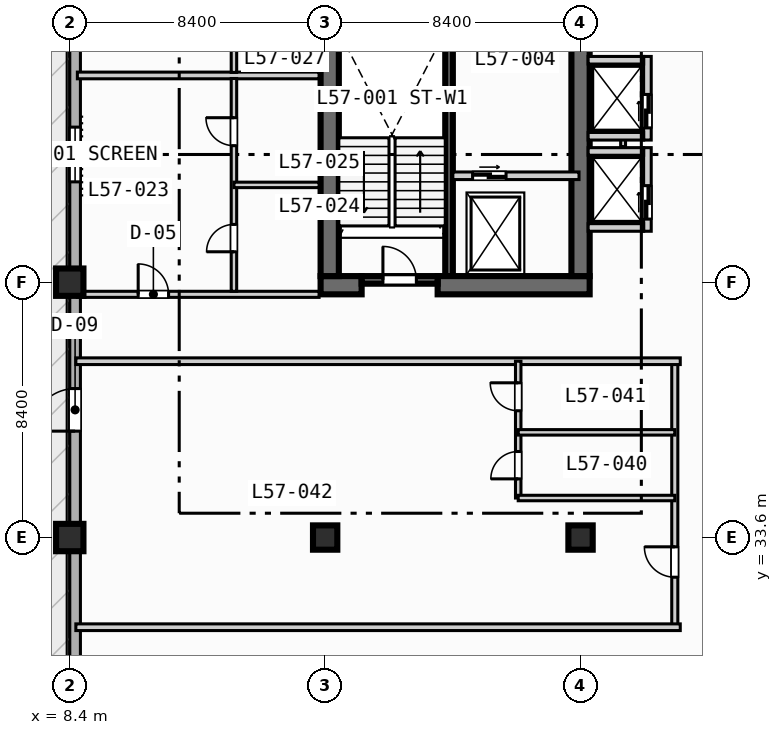
"""IFC4 building model, lengths in metres.
Left out: names, types, materials, properties, quantities, classifications, styles, units other than length and angle.
Written with IfcOpenShell. Run it as: python <this file> out.ifc"""

import sys

from ifc_helpers import new_model, si_unit, direction, frame, frame_2d, origin, origin_2d, place, context, subcontext, project, spatial, rectangle, extrude, element, fill, save


model = new_model("IFC4")
c1 = context("Model", 3, precision=1e-05, world=origin(), true_north=direction((0.0, 1.0)))
c2 = subcontext(c1, "Body", "Model", "MODEL_VIEW")
j1 = project(units=[si_unit("LENGTHUNIT", "METRE"), si_unit("PLANEANGLEUNIT", "RADIAN")], contexts=[c1])
p1 = place(None, origin())
s1 = spatial("IfcSite", under=j1, at=p1, CompositionType="ELEMENT")
p2 = place(p1, origin())
s2 = spatial("IfcBuilding", under=s1, at=p2, CompositionType="ELEMENT")
p3 = place(p2, frame((0.0, 0.0, 234.2)))
s3 = spatial("IfcBuildingStorey", under=s2, at=p3, CompositionType="ELEMENT", Elevation=234.2)
p4 = place(p3, frame((20.875, 42.2, 0.0), z_axis=(0.0, 0.0, 1.0), x_axis=(0.0, 1.0, 0.0)))
e1 = element("IfcWall", 1, at=p4, inside=s3, PredefinedType="SOLIDWALL", context=c2, shape_type="SweptSolid", body=[
    extrude(rectangle(XDim=8.05, YDim=0.25, at=frame_2d((4.025, 0.0))), origin(), (0.0, 0.0, 1.0), 3.47),
])
p5 = place(p3, frame((16.65, 41.9, 0.0), z_axis=(0.0, 0.0, 1.0), x_axis=(1.0, 0.0, 0.0)))
e2 = element("IfcWall", 2, at=p5, inside=s3, PredefinedType="SHEAR", context=c2, shape_type="SweptSolid", body=[
    extrude(rectangle(XDim=1.35, YDim=0.6, at=frame_2d((0.675, 0.0))), origin(), (0.0, 0.0, 1.0), 3.47),
])
p6 = place(p3, frame((20.5, 41.9, 0.0), z_axis=(0.0, 0.0, 1.0), x_axis=(1.0, 0.0, 0.0)))
e3 = element("IfcWall", 3, at=p6, inside=s3, PredefinedType="SHEAR", context=c2, shape_type="SweptSolid", body=[
    extrude(rectangle(XDim=5.0, YDim=0.6, at=frame_2d((2.5, 0.0))), origin(), (0.0, 0.0, 1.0), 3.47),
])
p7 = place(p3, frame((16.95, 42.2, 0.0), z_axis=(0.0, 0.0, 1.0), x_axis=(0.0, 1.0, 0.0)))
e4 = element("IfcWall", 4, at=p7, inside=s3, PredefinedType="SHEAR", context=c2, shape_type="SweptSolid", body=[
    extrude(rectangle(XDim=16.35, YDim=0.6, at=frame_2d((8.175, 0.0))), origin(), (0.0, 0.0, 1.0), 3.47),
])
p8 = place(p3, frame((25.2, 42.2, 0.0), z_axis=(0.0, 0.0, 1.0), x_axis=(0.0, 1.0, 0.0)))
e5 = element("IfcWall", 5, at=p8, inside=s3, PredefinedType="SHEAR", context=c2, shape_type="SweptSolid", body=[
    extrude(rectangle(XDim=8.6, YDim=0.6, at=frame_2d((4.3, 0.0))), origin(), (0.0, 0.0, 1.0), 3.47),
])
for number, where, z_axis, x_axis in (
    (6, (8.4, 33.6, 0.0), (0.0, 0.0, 1.0), (1.0, 0.0, 0.0)),
    (7, (8.4, 42.0, 0.0), (0.0, 0.0, 1.0), (1.0, 0.0, 0.0)),
):
    element("IfcColumn", number, at=place(p3, frame(where, z_axis=z_axis, x_axis=x_axis)), inside=s3, PredefinedType="COLUMN", context=c2, shape_type="SweptSolid", body=[
        extrude(rectangle(XDim=0.9, YDim=0.9, at=origin_2d()), origin(), (0.0, 0.0, 1.0), 3.7),
    ])
for number, where, z_axis, x_axis in (
    (8, (16.8, 33.6, 0.0), (0.0, 0.0, 1.0), (1.0, 0.0, 0.0)),
    (9, (25.2, 33.6, 0.0), (0.0, 0.0, 1.0), (1.0, 0.0, 0.0)),
):
    element("IfcColumn", number, at=place(p3, frame(where, z_axis=z_axis, x_axis=x_axis)), inside=s3, PredefinedType="COLUMN", context=c2, shape_type="SweptSolid", body=[
        extrude(rectangle(XDim=0.8, YDim=0.8, at=origin_2d()), origin(), (0.0, 0.0, 1.0), 3.7),
    ])
p9 = place(p3, frame((8.575, 11.575, 0.0), z_axis=(0.0, 0.0, 1.0), x_axis=(0.0, 1.0, 0.0)))
e10 = element("IfcWall", 10, at=p9, inside=s3, PredefinedType="STANDARD", context=c2, shape_type="SweptSolid", body=[
    extrude(rectangle(XDim=60.85, YDim=0.35, at=frame_2d((30.425, 0.0))), origin(), (0.0, 0.0, 1.0), 3.47),
])
p10 = place(p9, frame((25.525, 0.0, 0.0)))
e11 = element("IfcOpeningElement", 11, at=p10, cuts=e10, PredefinedType="OPENING", context=c2, shape_type="SweptSolid", body=[
    extrude(rectangle(XDim=1.4, YDim=2.2, at=frame_2d((0.7, 1.1))), frame((0.0, 0.185, 0.0), z_axis=(0.0, -1.0, 0.0), x_axis=(1.0, 0.0, 0.0)), (0.0, 0.0, 1.0), 0.37),
])
p11 = place(p9, frame((33.725, 0.0, 0.85)))
e12 = element("IfcOpeningElement", 12, at=p11, cuts=e10, PredefinedType="OPENING", context=c2, shape_type="SweptSolid", body=[
    extrude(rectangle(XDim=1.8, YDim=1.8, at=frame_2d((0.9, 0.9))), frame((0.0, 0.185, 0.0), z_axis=(0.0, -1.0, 0.0), x_axis=(1.0, 0.0, 0.0)), (0.0, 0.0, 1.0), 0.37),
])
p12 = place(p9, frame((41.825, 0.0, 0.85)))
e13 = element("IfcOpeningElement", 13, at=p12, cuts=e10, PredefinedType="OPENING", context=c2, shape_type="SweptSolid", body=[
    extrude(rectangle(XDim=2.4, YDim=1.95, at=frame_2d((1.2, 0.975))), frame((0.0, 0.185, 0.0), z_axis=(0.0, -1.0, 0.0), x_axis=(1.0, 0.0, 0.0)), (0.0, 0.0, 1.0), 0.37),
])
p13 = place(p3, frame((18.0, 42.075, 0.0), z_axis=(0.0, 0.0, 1.0), x_axis=(1.0, 0.0, 0.0)))
e14 = element("IfcWall", 14, at=p13, inside=s3, PredefinedType="SOLIDWALL", context=c2, shape_type="SweptSolid", body=[
    extrude(rectangle(XDim=2.5, YDim=0.25, at=frame_2d((1.25, 0.0))), origin(), (0.0, 0.0, 1.0), 3.47),
])
p14 = place(p13, frame((0.7, 0.0, 0.0)))
e15 = element("IfcOpeningElement", 15, at=p14, cuts=e14, PredefinedType="OPENING", context=c2, shape_type="SweptSolid", body=[
    extrude(rectangle(XDim=1.1, YDim=2.15, at=frame_2d((0.55, 1.075))), frame((0.0, 0.135, 0.0), z_axis=(0.0, -1.0, 0.0), x_axis=(1.0, 0.0, 0.0)), (0.0, 0.0, 1.0), 0.27),
])
p15 = place(p3, frame((21.0, 45.5, 0.0), z_axis=(0.0, 0.0, 1.0), x_axis=(1.0, 0.0, 0.0)))
e16 = element("IfcWall", 16, at=p15, inside=s3, PredefinedType="SOLIDWALL", context=c2, shape_type="SweptSolid", body=[
    extrude(rectangle(XDim=4.15, YDim=0.25, at=frame_2d((2.075, 0.0))), origin(), (0.0, 0.0, 1.0), 3.47),
])
p16 = place(p15, frame((0.65, 0.0, 0.0)))
e17 = element("IfcOpeningElement", 17, at=p16, cuts=e16, PredefinedType="OPENING", context=c2, shape_type="SweptSolid", body=[
    extrude(rectangle(XDim=1.1, YDim=2.15, at=frame_2d((0.55, 1.075))), frame((0.0, 0.135, 0.0), z_axis=(0.0, -1.0, 0.0), x_axis=(1.0, 0.0, 0.0)), (0.0, 0.0, 1.0), 0.27),
])
p17 = place(p3, frame((27.4, 43.675, 0.0), z_axis=(0.0, 0.0, 1.0), x_axis=(0.0, 1.0, 0.0)))
e18 = element("IfcWall", 18, at=p17, inside=s3, PredefinedType="SOLIDWALL", context=c2, shape_type="SweptSolid", body=[
    extrude(rectangle(XDim=2.75, YDim=0.25, at=frame_2d((1.375, 0.0))), origin(), (0.0, 0.0, 1.0), 3.47),
])
p18 = place(p17, frame((0.4, 0.0, 0.0)))
e19 = element("IfcOpeningElement", 19, at=p18, cuts=e18, PredefinedType="OPENING", context=c2, shape_type="SweptSolid", body=[
    extrude(rectangle(XDim=1.1, YDim=2.15, at=frame_2d((0.55, 1.075))), frame((0.0, 0.135, 0.0), z_axis=(0.0, -1.0, 0.0), x_axis=(1.0, 0.0, 0.0)), (0.0, 0.0, 1.0), 0.27),
])
for number, where, z_axis, x_axis in (
    (20, (25.45, 43.8, 0.0), (0.0, 0.0, 1.0), (1.0, 0.0, 0.0)),
    (21, (25.45, 46.3, 0.0), (0.0, 0.0, 1.0), (1.0, 0.0, 0.0)),
):
    element("IfcWall", number, at=place(p3, frame(where, z_axis=z_axis, x_axis=x_axis)), inside=s3, PredefinedType="SOLIDWALL", context=c2, shape_type="SweptSolid", body=[
        extrude(rectangle(XDim=1.825, YDim=0.25, at=frame_2d((0.913, 0.0))), origin(), (0.0, 0.0, 1.0), 3.47),
    ])
p19 = place(p3, frame((26.6, 46.46, 0.0), z_axis=(0.0, 0.0, 1.0), x_axis=(0.0, 1.0, 0.0)))
e22 = element("IfcWall", 22, at=p19, inside=s3, PredefinedType="PARTITIONING", context=c2, shape_type="SweptSolid", body=[
    extrude(rectangle(XDim=0.88, YDim=0.16, at=frame_2d((0.44, 0.0))), origin(), (0.0, 0.0, 1.0), 3.47),
])
p20 = place(p3, frame((27.4, 46.675, 0.0), z_axis=(0.0, 0.0, 1.0), x_axis=(0.0, 1.0, 0.0)))
e23 = element("IfcWall", 23, at=p20, inside=s3, PredefinedType="SOLIDWALL", context=c2, shape_type="SweptSolid", body=[
    extrude(rectangle(XDim=2.75, YDim=0.25, at=frame_2d((1.375, 0.0))), origin(), (0.0, 0.0, 1.0), 3.47),
])
p21 = place(p20, frame((0.4, 0.0, 0.0)))
e24 = element("IfcOpeningElement", 24, at=p21, cuts=e23, PredefinedType="OPENING", context=c2, shape_type="SweptSolid", body=[
    extrude(rectangle(XDim=1.1, YDim=2.15, at=frame_2d((0.55, 1.075))), frame((0.0, 0.135, 0.0), z_axis=(0.0, -1.0, 0.0), x_axis=(1.0, 0.0, 0.0)), (0.0, 0.0, 1.0), 0.27),
])
for number, where, z_axis, x_axis in (
    (25, (25.45, 46.8, 0.0), (0.0, 0.0, 1.0), (1.0, 0.0, 0.0)),
    (26, (25.45, 49.3, 0.0), (0.0, 0.0, 1.0), (1.0, 0.0, 0.0)),
):
    element("IfcWall", number, at=place(p3, frame(where, z_axis=z_axis, x_axis=x_axis)), inside=s3, PredefinedType="SOLIDWALL", context=c2, shape_type="SweptSolid", body=[
        extrude(rectangle(XDim=1.825, YDim=0.25, at=frame_2d((0.913, 0.0))), origin(), (0.0, 0.0, 1.0), 3.47),
    ])
p22 = place(p3, frame((8.65, 41.6, 0.0), z_axis=(0.0, 0.0, 1.0), x_axis=(1.0, 0.0, 0.0)))
e27 = element("IfcWall", 27, at=p22, inside=s3, PredefinedType="PARTITIONING", context=c2, shape_type="SweptSolid", body=[
    extrude(rectangle(XDim=7.95, YDim=0.2, at=frame_2d((3.975, 0.0))), origin(), (0.0, 0.0, 1.0), 3.47),
])
p23 = place(p22, frame((2.0, 0.0, 0.0)))
e28 = element("IfcOpeningElement", 28, at=p23, cuts=e27, PredefinedType="OPENING", context=c2, shape_type="SweptSolid", body=[
    extrude(rectangle(XDim=1.0, YDim=2.15, at=frame_2d((0.5, 1.075))), frame((0.0, 0.11, 0.0), z_axis=(0.0, -1.0, 0.0), x_axis=(1.0, 0.0, 0.0)), (0.0, 0.0, 1.0), 0.22),
])
p24 = place(p3, frame((8.65, 48.8, 0.0), z_axis=(0.0, 0.0, 1.0), x_axis=(1.0, 0.0, 0.0)))
e29 = element("IfcWall", 29, at=p24, inside=s3, PredefinedType="PARTITIONING", context=c2, shape_type="SweptSolid", body=[
    extrude(rectangle(XDim=7.95, YDim=0.22, at=frame_2d((3.975, 0.0))), origin(), (0.0, 0.0, 1.0), 3.47),
])
p25 = place(p3, frame((13.8, 41.7, 0.0), z_axis=(0.0, 0.0, 1.0), x_axis=(0.0, 1.0, 0.0)))
e30 = element("IfcWall", 30, at=p25, inside=s3, PredefinedType="PLUMBINGWALL", context=c2, shape_type="SweptSolid", body=[
    extrude(rectangle(XDim=7.0, YDim=0.18, at=frame_2d((3.5, 0.0))), origin(), (0.0, 0.0, 1.0), 3.47),
])
p26 = place(p25, frame((1.3, 0.0, 0.0)))
e31 = element("IfcOpeningElement", 31, at=p26, cuts=e30, PredefinedType="OPENING", context=c2, shape_type="SweptSolid", body=[
    extrude(rectangle(XDim=0.9, YDim=2.1, at=frame_2d((0.45, 1.05))), frame((0.0, 0.1, 0.0), z_axis=(0.0, -1.0, 0.0), x_axis=(1.0, 0.0, 0.0)), (0.0, 0.0, 1.0), 0.2),
])
p27 = place(p25, frame((4.79, 0.0, 0.0)))
e32 = element("IfcOpeningElement", 32, at=p27, cuts=e30, PredefinedType="OPENING", context=c2, shape_type="SweptSolid", body=[
    extrude(rectangle(XDim=0.92, YDim=2.1, at=frame_2d((0.46, 1.05))), frame((0.0, 0.1, 0.0), z_axis=(0.0, -1.0, 0.0), x_axis=(1.0, 0.0, 0.0)), (0.0, 0.0, 1.0), 0.2),
])
p28 = place(p3, frame((13.8, 45.2, 0.0), z_axis=(0.0, 0.0, 1.0), x_axis=(1.0, 0.0, 0.0)))
e33 = element("IfcWall", 33, at=p28, inside=s3, PredefinedType="PLUMBINGWALL", context=c2, shape_type="SweptSolid", body=[
    extrude(rectangle(XDim=2.8, YDim=0.18, at=frame_2d((1.4, 0.0))), origin(), (0.0, 0.0, 1.0), 3.47),
])
p29 = place(p3, frame((13.8, 48.9, 0.0), z_axis=(0.0, 0.0, 1.0), x_axis=(0.0, 1.0, 0.0)))
e34 = element("IfcWall", 34, at=p29, inside=s3, PredefinedType="PLUMBINGWALL", context=c2, shape_type="SweptSolid", body=[
    extrude(rectangle(XDim=10.0, YDim=0.18, at=frame_2d((5.0, 0.0))), origin(), (0.0, 0.0, 1.0), 3.47),
])
p30 = place(p29, frame((2.05, 0.0, 0.0)))
e35 = element("IfcOpeningElement", 35, at=p30, cuts=e34, PredefinedType="OPENING", context=c2, shape_type="SweptSolid", body=[
    extrude(rectangle(XDim=0.9, YDim=2.1, at=frame_2d((0.45, 1.05))), frame((0.0, 0.1, 0.0), z_axis=(0.0, -1.0, 0.0), x_axis=(1.0, 0.0, 0.0)), (0.0, 0.0, 1.0), 0.2),
])
p31 = place(p29, frame((7.04, 0.0, 0.0)))
e36 = element("IfcOpeningElement", 36, at=p31, cuts=e34, PredefinedType="OPENING", context=c2, shape_type="SweptSolid", body=[
    extrude(rectangle(XDim=0.92, YDim=2.1, at=frame_2d((0.46, 1.05))), frame((0.0, 0.1, 0.0), z_axis=(0.0, -1.0, 0.0), x_axis=(1.0, 0.0, 0.0)), (0.0, 0.0, 1.0), 0.2),
])
p32 = place(p3, frame((28.3, 30.65, 0.0), z_axis=(0.0, 0.0, 1.0), x_axis=(0.0, 1.0, 0.0)))
e37 = element("IfcWall", 37, at=p32, inside=s3, PredefinedType="PARTITIONING", context=c2, shape_type="SweptSolid", body=[
    extrude(rectangle(XDim=8.75, YDim=0.2, at=frame_2d((4.375, 0.0))), origin(), (0.0, 0.0, 1.0), 3.47),
])
p33 = place(p32, frame((1.645, 0.0, 0.0)))
e38 = element("IfcOpeningElement", 38, at=p33, cuts=e37, PredefinedType="OPENING", context=c2, shape_type="SweptSolid", body=[
    extrude(rectangle(XDim=1.0, YDim=2.15, at=frame_2d((0.5, 1.075))), frame((0.0, 0.11, 0.0), z_axis=(0.0, -1.0, 0.0), x_axis=(1.0, 0.0, 0.0)), (0.0, 0.0, 1.0), 0.22),
])
for number, where, z_axis, x_axis in (
    (39, (8.6, 30.65, 0.0), (0.0, 0.0, 1.0), (1.0, 0.0, 0.0)),
    (40, (8.6, 39.4, 0.0), (0.0, 0.0, 1.0), (1.0, 0.0, 0.0)),
):
    element("IfcWall", number, at=place(p3, frame(where, z_axis=z_axis, x_axis=x_axis)), inside=s3, PredefinedType="PARTITIONING", context=c2, shape_type="SweptSolid", body=[
        extrude(rectangle(XDim=19.88, YDim=0.22, at=frame_2d((9.94, 0.0))), origin(), (0.0, 0.0, 1.0), 3.47),
    ])
p34 = place(p3, frame((23.15, 34.9, 0.0), z_axis=(0.0, 0.0, 1.0), x_axis=(0.0, 1.0, 0.0)))
e41 = element("IfcWall", 41, at=p34, inside=s3, PredefinedType="PLUMBINGWALL", context=c2, shape_type="SweptSolid", body=[
    extrude(rectangle(XDim=4.5, YDim=0.18, at=frame_2d((2.25, 0.0))), origin(), (0.0, 0.0, 1.0), 3.47),
])
p35 = place(p34, frame((0.63, 0.0, 0.0)))
e42 = element("IfcOpeningElement", 42, at=p35, cuts=e41, PredefinedType="OPENING", context=c2, shape_type="SweptSolid", body=[
    extrude(rectangle(XDim=0.9, YDim=2.1, at=frame_2d((0.45, 1.05))), frame((0.0, 0.1, 0.0), z_axis=(0.0, -1.0, 0.0), x_axis=(1.0, 0.0, 0.0)), (0.0, 0.0, 1.0), 0.2),
])
p36 = place(p34, frame((2.87, 0.0, 0.0)))
e43 = element("IfcOpeningElement", 43, at=p36, cuts=e41, PredefinedType="OPENING", context=c2, shape_type="SweptSolid", body=[
    extrude(rectangle(XDim=0.92, YDim=2.1, at=frame_2d((0.46, 1.05))), frame((0.0, 0.1, 0.0), z_axis=(0.0, -1.0, 0.0), x_axis=(1.0, 0.0, 0.0)), (0.0, 0.0, 1.0), 0.2),
])
for number, where, z_axis, x_axis in (
    (44, (23.15, 34.9, 0.0), (0.0, 0.0, 1.0), (1.0, 0.0, 0.0)),
    (45, (23.15, 37.06, 0.0), (0.0, 0.0, 1.0), (1.0, 0.0, 0.0)),
):
    element("IfcWall", number, at=place(p3, frame(where, z_axis=z_axis, x_axis=x_axis)), inside=s3, PredefinedType="PLUMBINGWALL", context=c2, shape_type="SweptSolid", body=[
        extrude(rectangle(XDim=5.15, YDim=0.18, at=frame_2d((2.575, 0.0))), origin(), (0.0, 0.0, 1.0), 3.47),
    ])
p37 = place(p10, origin())
e46 = element("IfcDoor", 46, at=p37, inside=s3, OperationType="SINGLE_SWING_LEFT", PredefinedType="DOOR", context=c2, shape_type="SweptSolid", body=[
    extrude(rectangle(XDim=1.4, YDim=2.2, at=frame_2d((0.7, 1.1))), frame((0.0, 0.025, 0.0), z_axis=(0.0, -1.0, 0.0), x_axis=(1.0, 0.0, 0.0)), (0.0, 0.0, 1.0), 0.05),
])
fill(e11, e46)
p38 = place(p11, origin())
e47 = element("IfcWindow", 47, at=p38, inside=s3, PartitioningType="SINGLE_PANEL", PredefinedType="WINDOW", context=c2, shape_type="SweptSolid", body=[
    extrude(rectangle(XDim=1.8, YDim=1.8, at=frame_2d((0.9, 0.9))), frame((0.0, 0.03, 0.0), z_axis=(0.0, -1.0, 0.0), x_axis=(1.0, 0.0, 0.0)), (0.0, 0.0, 1.0), 0.06),
])
fill(e12, e47)
p39 = place(p14, origin())
e48 = element("IfcDoor", 48, at=p39, inside=s3, OperationType="SINGLE_SWING_LEFT", PredefinedType="DOOR", context=c2, shape_type="SweptSolid", body=[
    extrude(rectangle(XDim=1.1, YDim=2.15, at=frame_2d((0.55, 1.075))), frame((0.0, 0.025, 0.0), z_axis=(0.0, -1.0, 0.0), x_axis=(1.0, 0.0, 0.0)), (0.0, 0.0, 1.0), 0.05),
])
fill(e15, e48)
p40 = place(p16, origin())
e49 = element("IfcDoor", 49, at=p40, inside=s3, OperationType="SLIDING_TO_LEFT", PredefinedType="DOOR", context=c2, shape_type="SweptSolid", body=[
    extrude(rectangle(XDim=1.1, YDim=2.15, at=frame_2d((0.55, 1.075))), frame((0.0, 0.025, 0.0), z_axis=(0.0, -1.0, 0.0), x_axis=(1.0, 0.0, 0.0)), (0.0, 0.0, 1.0), 0.05),
])
fill(e17, e49)
p41 = place(p18, origin())
e50 = element("IfcDoor", 50, at=p41, inside=s3, OperationType="SLIDING_TO_LEFT", PredefinedType="DOOR", context=c2, shape_type="SweptSolid", body=[
    extrude(rectangle(XDim=1.1, YDim=2.15, at=frame_2d((0.55, 1.075))), frame((0.0, 0.025, 0.0), z_axis=(0.0, -1.0, 0.0), x_axis=(1.0, 0.0, 0.0)), (0.0, 0.0, 1.0), 0.05),
])
fill(e19, e50)
p42 = place(p21, origin())
e51 = element("IfcDoor", 51, at=p42, inside=s3, OperationType="SLIDING_TO_LEFT", PredefinedType="DOOR", context=c2, shape_type="SweptSolid", body=[
    extrude(rectangle(XDim=1.1, YDim=2.15, at=frame_2d((0.55, 1.075))), frame((0.0, 0.025, 0.0), z_axis=(0.0, -1.0, 0.0), x_axis=(1.0, 0.0, 0.0)), (0.0, 0.0, 1.0), 0.05),
])
fill(e24, e51)
p43 = place(p23, origin())
e52 = element("IfcDoor", 52, at=p43, inside=s3, OperationType="SINGLE_SWING_LEFT", PredefinedType="DOOR", context=c2, shape_type="SweptSolid", body=[
    extrude(rectangle(XDim=1.0, YDim=2.15, at=frame_2d((0.5, 1.075))), frame((0.0, 0.025, 0.0), z_axis=(0.0, -1.0, 0.0), x_axis=(1.0, 0.0, 0.0)), (0.0, 0.0, 1.0), 0.05),
])
fill(e28, e52)
p44 = place(p26, origin())
e53 = element("IfcDoor", 53, at=p44, inside=s3, OperationType="SINGLE_SWING_LEFT", PredefinedType="DOOR", context=c2, shape_type="SweptSolid", body=[
    extrude(rectangle(XDim=0.9, YDim=2.1, at=frame_2d((0.45, 1.05))), frame((0.0, 0.025, 0.0), z_axis=(0.0, -1.0, 0.0), x_axis=(1.0, 0.0, 0.0)), (0.0, 0.0, 1.0), 0.05),
])
fill(e31, e53)
p45 = place(p27, origin())
e54 = element("IfcDoor", 54, at=p45, inside=s3, OperationType="SINGLE_SWING_RIGHT", PredefinedType="DOOR", context=c2, shape_type="SweptSolid", body=[
    extrude(rectangle(XDim=0.92, YDim=2.1, at=frame_2d((0.46, 1.05))), frame((0.0, 0.025, 0.0), z_axis=(0.0, -1.0, 0.0), x_axis=(1.0, 0.0, 0.0)), (0.0, 0.0, 1.0), 0.05),
])
fill(e32, e54)
p46 = place(p33, origin())
e55 = element("IfcDoor", 55, at=p46, inside=s3, OperationType="SINGLE_SWING_RIGHT", PredefinedType="DOOR", context=c2, shape_type="SweptSolid", body=[
    extrude(rectangle(XDim=1.0, YDim=2.15, at=frame_2d((0.5, 1.075))), frame((0.0, 0.025, 0.0), z_axis=(0.0, -1.0, 0.0), x_axis=(1.0, 0.0, 0.0)), (0.0, 0.0, 1.0), 0.05),
])
fill(e38, e55)
p47 = place(p35, origin())
e56 = element("IfcDoor", 56, at=p47, inside=s3, OperationType="SINGLE_SWING_LEFT", PredefinedType="DOOR", context=c2, shape_type="SweptSolid", body=[
    extrude(rectangle(XDim=0.9, YDim=2.1, at=frame_2d((0.45, 1.05))), frame((0.0, 0.025, 0.0), z_axis=(0.0, -1.0, 0.0), x_axis=(1.0, 0.0, 0.0)), (0.0, 0.0, 1.0), 0.05),
])
fill(e42, e56)
p48 = place(p36, origin())
e57 = element("IfcDoor", 57, at=p48, inside=s3, OperationType="SINGLE_SWING_RIGHT", PredefinedType="DOOR", context=c2, shape_type="SweptSolid", body=[
    extrude(rectangle(XDim=0.92, YDim=2.1, at=frame_2d((0.46, 1.05))), frame((0.0, 0.025, 0.0), z_axis=(0.0, -1.0, 0.0), x_axis=(1.0, 0.0, 0.0)), (0.0, 0.0, 1.0), 0.05),
])
fill(e43, e57)
save(model, sys.argv[1])
